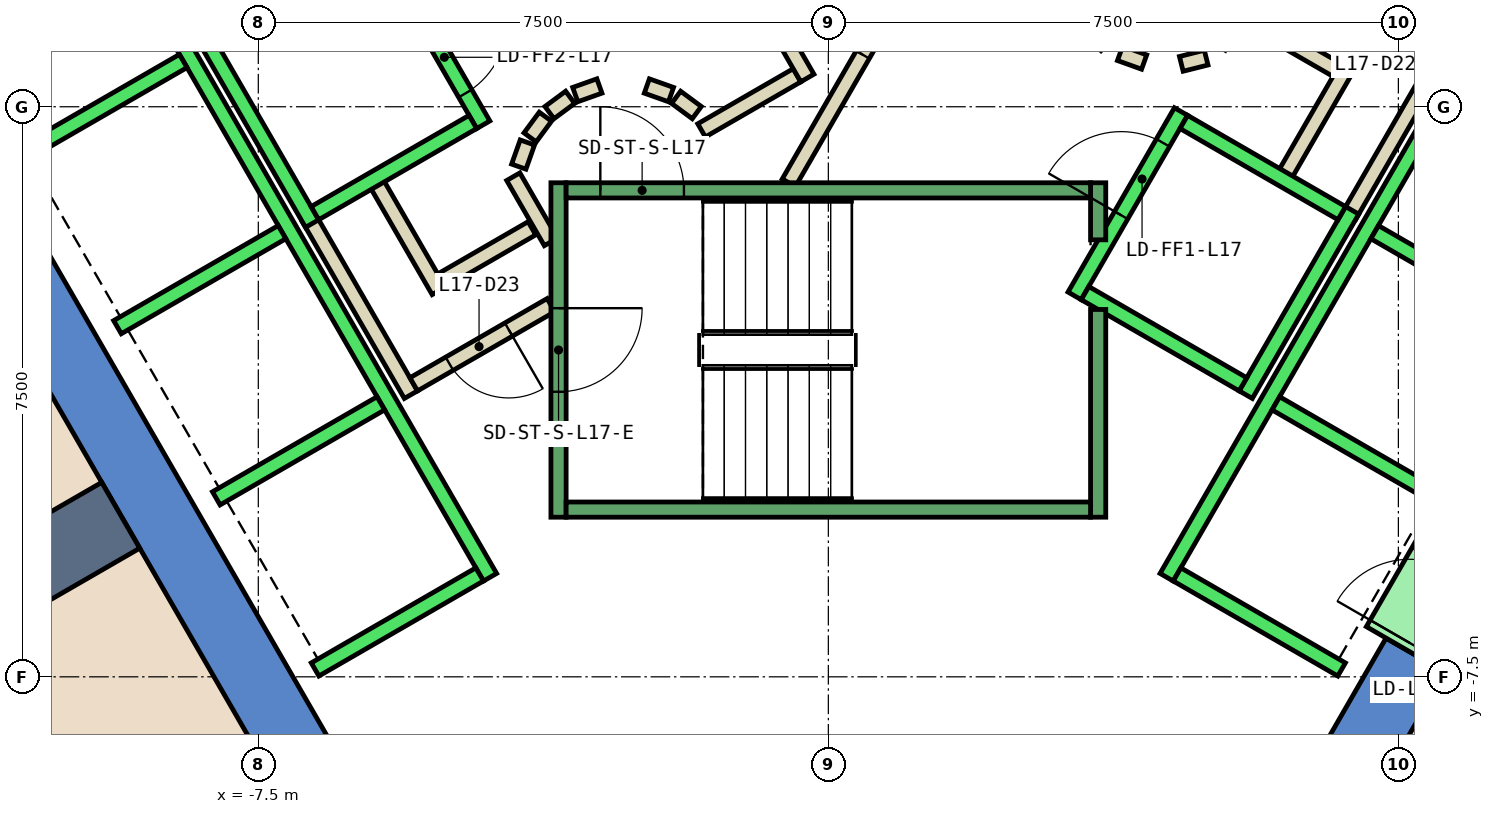
"""IFC4 building model, lengths in metres.
Left out: names, types, materials, properties, quantities, classifications, styles, units other than length and angle.
Written with IfcOpenShell. Run it as: python <this file> out.ifc"""

import sys

from ifc_helpers import new_model, si_unit, direction, frame, frame_2d, origin, place, context, subcontext, project, spatial, polyline, rectangle, outline, extrude, element, fill, save


model = new_model("IFC4")
c1 = context("Model", 3, precision=1e-05, world=origin(), true_north=direction((0.0, 1.0)))
c2 = subcontext(c1, "Body", "Model", "MODEL_VIEW")
j1 = project(units=[si_unit("LENGTHUNIT", "METRE"), si_unit("PLANEANGLEUNIT", "RADIAN")], contexts=[c1])
p1 = place(None, origin())
s1 = spatial("IfcSite", under=j1, at=p1, CompositionType="ELEMENT")
p2 = place(p1, origin())
s2 = spatial("IfcBuilding", under=s1, at=p2, CompositionType="ELEMENT")
p3 = place(p2, frame((0.0, 0.0, 81.2)))
s3 = spatial("IfcBuildingStorey", under=s2, at=p3, CompositionType="ELEMENT", Elevation=81.2)
p4 = place(p3, frame((0.0, 0.0, -0.6)))
e1 = element("IfcWall", 1, at=p4, inside=s3, PredefinedType="SHEAR", context=c2, shape_type="SweptSolid", body=[
    extrude(outline(polyline([(-13.856, 2.5), (-6.928, -9.5), (-6.409, -8.6), (-12.817, 2.5), (-13.856, 2.5)])), origin(), (0.0, 0.0, 1.0), 5.4),
])
p5 = place(p3, frame((0.0, 0.0, -0.6)))
e2 = element("IfcWall", 2, at=p5, inside=s3, PredefinedType="SHEAR", context=c2, shape_type="SweptSolid", body=[
    extrude(outline(polyline([(8.117, -7.44), (7.338, -6.99), (6.409, -8.6), (6.928, -9.5), (8.117, -7.44)])), origin(), (0.0, 0.0, 1.0), 5.4),
])
p6 = place(p3, frame((0.0, 0.0, 3.6)))
e3 = element("IfcWall", 3, at=p6, inside=s3, PredefinedType="SHEAR", context=c2, shape_type="SweptSolid", body=[
    extrude(outline(polyline([(8.767, -6.314), (7.988, -5.864), (7.338, -6.99), (8.117, -7.44), (8.767, -6.314)])), origin(), (0.0, 0.0, 1.0), 1.2),
])
p7 = place(p3, frame((-9.31, -5.375, 0.0), z_axis=(0.0, 0.0, 1.0), x_axis=(-0.866022967049, -0.500004220526, 0.0)))
e4 = element("IfcWall", 4, at=p7, inside=s3, PredefinedType="SHEAR", context=c2, shape_type="SweptSolid", body=[
    extrude(rectangle(XDim=35.802, YDim=1.0, at=frame_2d((17.901, 0.0))), origin(), (0.0, 0.0, 1.0), 4.8),
])
p8 = place(p3, frame((5.499, 1.172, 0.0), z_axis=(0.0, 0.0, 1.0), x_axis=(0.866333505267, -0.499465972466, 0.0)))
e5 = element("IfcWall", 5, at=p8, inside=s3, PredefinedType="PARTITIONING", context=c2, shape_type="SweptSolid", body=[
    extrude(rectangle(XDim=1.374, YDim=0.2, at=frame_2d((0.687, 0.0))), origin(), (0.0, 0.0, 1.0), 4.8),
])
p9 = place(p3, frame((6.826, 0.522, 0.0), z_axis=(0.0, 0.0, 1.0), x_axis=(-0.500016722714, -0.866015748706, 0.0)))
e6 = element("IfcWall", 6, at=p9, inside=s3, PredefinedType="PARTITIONING", context=c2, shape_type="SweptSolid", body=[
    extrude(rectangle(XDim=1.7, YDim=0.2, at=frame_2d((0.85, 0.0))), origin(), (0.0, 0.0, 1.0), 4.8),
])
p10 = place(p3, frame((8.192, 0.888, 0.0), z_axis=(0.0, 0.0, 1.0), x_axis=(-0.499940625693, -0.866059680843, 0.0)))
e7 = element("IfcWall", 7, at=p10, inside=s3, PredefinedType="PARTITIONING", context=c2, shape_type="SweptSolid", body=[
    extrude(rectangle(XDim=2.68, YDim=0.2, at=frame_2d((1.34, 0.0))), origin(), (0.0, 0.0, 1.0), 4.8),
])
p11 = place(p3, frame((-3.9, -1.599, 0.0), z_axis=(0.0, 0.0, 1.0), x_axis=(-0.865969445389, -0.500096910261, 0.0)))
e8 = element("IfcWall", 8, at=p11, inside=s3, PredefinedType="PARTITIONING", context=c2, shape_type="SweptSolid", body=[
    extrude(rectangle(XDim=1.373, YDim=0.2, at=frame_2d((0.687, 0.0))), origin(), (0.0, 0.0, 1.0), 4.8),
])
p12 = place(p3, frame((-5.126, -2.422, 0.0), z_axis=(0.0, 0.0, 1.0), x_axis=(-0.500062241894, 0.865989465428, 0.0)))
e9 = element("IfcWall", 9, at=p12, inside=s3, PredefinedType="PARTITIONING", context=c2, shape_type="SweptSolid", body=[
    extrude(rectangle(XDim=1.7, YDim=0.2, at=frame_2d((0.85, 0.0))), origin(), (0.0, 0.0, 1.0), 4.8),
])
p13 = place(p3, frame((-5.492, -3.788, 0.0), z_axis=(0.0, 0.0, 1.0), x_axis=(-0.500008949224, 0.866020236886, 0.0)))
e10 = element("IfcWall", 10, at=p13, inside=s3, PredefinedType="PARTITIONING", context=c2, shape_type="SweptSolid", body=[
    extrude(rectangle(XDim=2.68, YDim=0.2, at=frame_2d((1.34, 0.0))), origin(), (0.0, 0.0, 1.0), 4.8),
])
p14 = place(p3, frame((-4.145, -0.92, 0.0), z_axis=(0.0, 0.0, 1.0), x_axis=(0.499743786207, -0.866173278362, 0.0)))
e11 = element("IfcWall", 11, at=p14, inside=s3, PredefinedType="PARTITIONING", context=c2, shape_type="SweptSolid", body=[
    extrude(rectangle(XDim=0.991, YDim=0.2, at=frame_2d((0.495, 0.0))), origin(), (0.0, 0.0, 1.0), 4.8),
])
p15 = place(p3, frame((-3.65, -2.61, 0.0), z_axis=(0.0, 0.0, 1.0), x_axis=(-0.866072462134, -0.499918483688, 0.0)))
e12 = element("IfcWall", 12, at=p15, inside=s3, PredefinedType="PARTITIONING", context=c2, shape_type="SweptSolid", body=[
    extrude(rectangle(XDim=2.084, YDim=0.2, at=frame_2d((1.042, 0.0))), origin(), (0.0, 0.0, 1.0), 4.8),
])
p16 = place(p15, frame((0.642, 0.0, 0.0)))
e13 = element("IfcOpeningElement", 13, at=p16, cuts=e12, PredefinedType="OPENING", context=c2, shape_type="SweptSolid", body=[
    extrude(rectangle(XDim=0.9, YDim=2.1, at=frame_2d((0.45, 1.05))), frame((0.0, 0.11, 0.0), z_axis=(0.0, -1.0, 0.0), x_axis=(1.0, 0.0, 0.0)), (0.0, 0.0, 1.0), 0.22),
])
p17 = place(p3, frame((3.838, 0.702, 0.0), z_axis=(0.0, 0.0, 1.0), x_axis=(0.941035081519, -0.338308993895, 0.0)))
e14 = element("IfcWall", 14, at=p17, inside=s3, PredefinedType="PARTITIONING", context=c2, shape_type="SweptSolid", body=[
    extrude(rectangle(XDim=0.337, YDim=0.2, at=frame_2d((0.168, 0.0))), origin(), (0.0, 0.0, 1.0), 4.8),
])
p18 = place(p3, frame((4.644, 0.564, 0.0), z_axis=(0.0, 0.0, 1.0), x_axis=(0.969929076366, 0.243387729394, 0.0)))
e15 = element("IfcWall", 15, at=p18, inside=s3, PredefinedType="PARTITIONING", context=c2, shape_type="SweptSolid", body=[
    extrude(rectangle(XDim=0.337, YDim=0.2, at=frame_2d((0.168, 0.0))), origin(), (0.0, 0.0, 1.0), 4.8),
])
p19 = place(p3, frame((-0.52, -1.0, 0.0), z_axis=(0.0, 0.0, 1.0), x_axis=(0.50011622646, 0.865958290007, 0.0)))
e16 = element("IfcWall", 16, at=p19, inside=s3, PredefinedType="PARTITIONING", context=c2, shape_type="SweptSolid", body=[
    extrude(rectangle(XDim=4.991, YDim=0.2, at=frame_2d((2.496, 0.0))), origin(), (0.0, 0.0, 1.0), 4.8),
])
p20 = place(p19, frame((1.945, 0.0, 0.0)))
e17 = element("IfcOpeningElement", 17, at=p20, cuts=e16, PredefinedType="OPENING", context=c2, shape_type="SweptSolid", body=[
    extrude(rectangle(XDim=1.0, YDim=2.1, at=frame_2d((0.5, 1.05))), frame((0.0, 0.11, 0.0), z_axis=(0.0, -1.0, 0.0), x_axis=(1.0, 0.0, 0.0)), (0.0, 0.0, 1.0), 0.22),
])
p21 = place(p3, frame((-0.412, 0.414, 0.0), z_axis=(0.0, 0.0, 1.0), x_axis=(-0.866017369001, -0.500013916395, 0.0)))
e18 = element("IfcWall", 18, at=p21, inside=s3, PredefinedType="PARTITIONING", context=c2, shape_type="SweptSolid", body=[
    extrude(rectangle(XDim=1.45, YDim=0.2, at=frame_2d((0.725, 0.0))), origin(), (0.0, 0.0, 1.0), 4.8),
])
p22 = place(p3, frame((-1.731, -0.077, 0.0), z_axis=(0.0, 0.0, 1.0), x_axis=(-0.804311165252, 0.594208338422, 0.0)))
e19 = element("IfcWall", 19, at=p22, inside=s3, PredefinedType="PARTITIONING", context=c2, shape_type="SweptSolid", body=[
    extrude(rectangle(XDim=0.338, YDim=0.2, at=frame_2d((0.169, 0.0))), origin(), (0.0, 0.0, 1.0), 4.8),
])
p23 = place(p3, frame((-2.07, 0.16, 0.0), z_axis=(0.0, 0.0, 1.0), x_axis=(-0.942199461132, 0.335052496547, 0.0)))
e20 = element("IfcWall", 20, at=p23, inside=s3, PredefinedType="PARTITIONING", context=c2, shape_type="SweptSolid", body=[
    extrude(rectangle(XDim=0.337, YDim=0.2, at=frame_2d((0.169, 0.0))), origin(), (0.0, 0.0, 1.0), 4.8),
])
p24 = place(p3, frame((-3.012, 0.273, 0.0), z_axis=(0.0, 0.0, 1.0), x_axis=(-0.942280615813, -0.334824194261, 0.0)))
e21 = element("IfcWall", 21, at=p24, inside=s3, PredefinedType="PARTITIONING", context=c2, shape_type="SweptSolid", body=[
    extrude(rectangle(XDim=0.338, YDim=0.2, at=frame_2d((0.169, 0.0))), origin(), (0.0, 0.0, 1.0), 4.8),
])
p25 = place(p3, frame((-3.397, 0.124, 0.0), z_axis=(0.0, 0.0, 1.0), x_axis=(-0.804311165252, -0.594208338422, 0.0)))
e22 = element("IfcWall", 22, at=p25, inside=s3, PredefinedType="PARTITIONING", context=c2, shape_type="SweptSolid", body=[
    extrude(rectangle(XDim=0.338, YDim=0.2, at=frame_2d((0.169, 0.0))), origin(), (0.0, 0.0, 1.0), 4.8),
])
p26 = place(p3, frame((-3.723, -0.131, 0.0), z_axis=(0.0, 0.0, 1.0), x_axis=(-0.594675113454, -0.803966112121, 0.0)))
e23 = element("IfcWall", 23, at=p26, inside=s3, PredefinedType="PARTITIONING", context=c2, shape_type="SweptSolid", body=[
    extrude(rectangle(XDim=0.338, YDim=0.2, at=frame_2d((0.169, 0.0))), origin(), (0.0, 0.0, 1.0), 4.8),
])
p27 = place(p3, frame((-3.96, -0.47, 0.0), z_axis=(0.0, 0.0, 1.0), x_axis=(-0.334824194261, -0.942280615813, 0.0)))
e24 = element("IfcWall", 24, at=p27, inside=s3, PredefinedType="PARTITIONING", context=c2, shape_type="SweptSolid", body=[
    extrude(rectangle(XDim=0.338, YDim=0.2, at=frame_2d((0.169, 0.0))), origin(), (0.0, 0.0, 1.0), 4.8),
])
p28 = place(p3, frame((-2.771, 4.7, 0.0), z_axis=(0.0, 0.0, 1.0), x_axis=(0.499969479948, -0.866043023828, 0.0)))
e25 = element("IfcWall", 25, at=p28, inside=s3, PredefinedType="PARTITIONING", context=c2, shape_type="SweptSolid", body=[
    extrude(rectangle(XDim=4.99, YDim=0.2, at=frame_2d((2.495, 0.0))), origin(), (0.0, 0.0, 1.0), 4.8),
])
p29 = place(p28, frame((1.945, 0.0, 0.0)))
e26 = element("IfcOpeningElement", 26, at=p29, cuts=e25, PredefinedType="OPENING", context=c2, shape_type="SweptSolid", body=[
    extrude(rectangle(XDim=1.0, YDim=2.1, at=frame_2d((0.5, 1.05))), frame((0.0, 0.11, 0.0), z_axis=(0.0, -1.0, 0.0), x_axis=(1.0, 0.0, 0.0)), (0.0, 0.0, 1.0), 0.22),
])
p30 = place(p3, frame((-8.264, -11.987, 0.0), z_axis=(0.0, 0.0, 1.0), x_axis=(-0.499907863044, 0.866078592546, 0.0)))
e27 = element("IfcWall", 27, at=p30, inside=s3, PredefinedType="PARTITIONING", context=c2, shape_type="SweptSolid", body=[
    extrude(rectangle(XDim=5.699, YDim=0.2, at=frame_2d((2.85, 0.0))), origin(), (0.0, 0.0, 1.0), 4.8),
])
p31 = place(p30, frame((1.419, 0.0, 0.0)))
e28 = element("IfcOpeningElement", 28, at=p31, cuts=e27, PredefinedType="OPENING", context=c2, shape_type="SweptSolid", body=[
    extrude(rectangle(XDim=1.0, YDim=2.1, at=frame_2d((0.5, 1.05))), frame((0.0, 0.11, 0.0), z_axis=(0.0, -1.0, 0.0), x_axis=(1.0, 0.0, 0.0)), (0.0, 0.0, 1.0), 0.22),
])
p32 = place(p3, frame((-5.94, 2.188, 0.0), z_axis=(0.0, 0.0, 1.0), x_axis=(0.49994636267, -0.866056369097, 0.0)))
e29 = element("IfcWall", 29, at=p32, inside=s3, PredefinedType="STANDARD", context=c2, shape_type="SweptSolid", body=[
    extrude(rectangle(XDim=2.8, YDim=0.2, at=frame_2d((1.4, 0.0))), origin(), (0.0, 0.0, 1.0), 4.8),
])
p33 = place(p32, frame((1.225, 0.0, 0.0)))
e30 = element("IfcOpeningElement", 30, at=p33, cuts=e29, PredefinedType="OPENING", context=c2, shape_type="SweptSolid", body=[
    extrude(rectangle(XDim=1.1, YDim=2.1, at=frame_2d((0.55, 1.05))), frame((0.0, 0.11, 0.0), z_axis=(0.0, -1.0, 0.0), x_axis=(1.0, 0.0, 0.0)), (0.0, 0.0, 1.0), 0.22),
])
p34 = place(p3, frame((-8.192, 0.888, 0.0), z_axis=(0.0, 0.0, 1.0), x_axis=(0.49994636267, -0.866056369097, 0.0)))
e31 = element("IfcWall", 31, at=p34, inside=s3, PredefinedType="STANDARD", context=c2, shape_type="SweptSolid", body=[
    extrude(rectangle(XDim=2.8, YDim=0.2, at=frame_2d((1.4, 0.0))), origin(), (0.0, 0.0, 1.0), 4.8),
])
p35 = place(p3, frame((-4.677, -0.2, 0.0), z_axis=(0.0, 0.0, 1.0), x_axis=(-0.865973769406, -0.500089422704, 0.0)))
e32 = element("IfcWall", 32, at=p35, inside=s3, PredefinedType="STANDARD", context=c2, shape_type="SweptSolid", body=[
    extrude(rectangle(XDim=2.399, YDim=0.2, at=frame_2d((1.2, 0.0))), origin(), (0.0, 0.0, 1.0), 4.8),
])
p36 = place(p3, frame((-9.751, 2.99, 0.0), z_axis=(0.0, 0.0, 1.0), x_axis=(0.50000090737, -0.866024879913, 0.0)))
e33 = element("IfcWall", 33, at=p36, inside=s3, PredefinedType="STANDARD", context=c2, shape_type="SweptSolid", body=[
    extrude(rectangle(XDim=10.6, YDim=0.2, at=frame_2d((5.3, 0.0))), origin(), (0.0, 0.0, 1.0), 4.8),
])
for number, where, z_axis, x_axis in (
    (34, (-8.488, 0.602, 0.0), (0.0, 0.0, 1.0), (-0.866, -0.5, 0.0)),
    (35, (-7.188, -1.65, 0.0), (0.0, 0.0, 1.0), (-0.866, -0.5, 0.0)),
    (36, (-5.888, -3.902, 0.0), (0.0, 0.0, 1.0), (-0.866, -0.5, 0.0)),
    (37, (-4.588, -6.153, 0.0), (0.0, 0.0, 1.0), (-0.866, -0.5, 0.0)),
):
    element("IfcWall", number, at=place(p3, frame(where, z_axis=z_axis, x_axis=x_axis)), inside=s3, PredefinedType="STANDARD", context=c2, shape_type="SweptSolid", body=[
        extrude(rectangle(XDim=2.5, YDim=0.2, at=frame_2d((1.25, 0.0))), origin(), (0.0, 0.0, 1.0), 4.8),
    ])
p37 = place(p3, frame((3.24, -2.488, 0.0), z_axis=(0.0, 0.0, 1.0), x_axis=(0.49994636267, 0.866056369097, 0.0)))
e38 = element("IfcWall", 38, at=p37, inside=s3, PredefinedType="STANDARD", context=c2, shape_type="SweptSolid", body=[
    extrude(rectangle(XDim=2.8, YDim=0.2, at=frame_2d((1.4, 0.0))), origin(), (0.0, 0.0, 1.0), 4.8),
])
p38 = place(p37, frame((1.225, 0.0, 0.0)))
e39 = element("IfcOpeningElement", 39, at=p38, cuts=e38, PredefinedType="OPENING", context=c2, shape_type="SweptSolid", body=[
    extrude(rectangle(XDim=1.1, YDim=2.1, at=frame_2d((0.55, 1.05))), frame((0.0, 0.11, 0.0), z_axis=(0.0, -1.0, 0.0), x_axis=(1.0, 0.0, 0.0)), (0.0, 0.0, 1.0), 0.22),
])
p39 = place(p3, frame((5.492, -3.788, 0.0), z_axis=(0.0, 0.0, 1.0), x_axis=(0.500011755427, 0.866018616679, 0.0)))
e40 = element("IfcWall", 40, at=p39, inside=s3, PredefinedType="STANDARD", context=c2, shape_type="SweptSolid", body=[
    extrude(rectangle(XDim=2.8, YDim=0.2, at=frame_2d((1.4, 0.0))), origin(), (0.0, 0.0, 1.0), 4.8),
])
p40 = place(p3, frame((3.377, -2.452, 0.0), z_axis=(0.0, 0.0, 1.0), x_axis=(0.865955154139, -0.50012165622, 0.0)))
e41 = element("IfcWall", 41, at=p40, inside=s3, PredefinedType="STANDARD", context=c2, shape_type="SweptSolid", body=[
    extrude(rectangle(XDim=2.4, YDim=0.2, at=frame_2d((1.2, 0.0))), origin(), (0.0, 0.0, 1.0), 4.8),
])
p41 = place(p3, frame((4.677, -0.2, 0.0), z_axis=(0.0, 0.0, 1.0), x_axis=(0.865973769406, -0.500089422704, 0.0)))
e42 = element("IfcWall", 42, at=p41, inside=s3, PredefinedType="STANDARD", context=c2, shape_type="SweptSolid", body=[
    extrude(rectangle(XDim=2.399, YDim=0.2, at=frame_2d((1.2, 0.0))), origin(), (0.0, 0.0, 1.0), 4.8),
])
p42 = place(p3, frame((4.451, -6.19, 0.0), z_axis=(0.0, 0.0, 1.0), x_axis=(0.50000090737, 0.866024879913, 0.0)))
e43 = element("IfcWall", 43, at=p42, inside=s3, PredefinedType="STANDARD", context=c2, shape_type="SweptSolid", body=[
    extrude(rectangle(XDim=10.6, YDim=0.2, at=frame_2d((5.3, 0.0))), origin(), (0.0, 0.0, 1.0), 4.8),
])
for number, where, z_axis, x_axis in (
    (44, (4.588, -6.153, 0.0), (0.0, 0.0, 1.0), (0.866, -0.5, 0.0)),
    (45, (5.888, -3.902, 0.0), (0.0, 0.0, 1.0), (0.866, -0.5, 0.0)),
    (46, (7.188, -1.65, 0.0), (0.0, 0.0, 1.0), (0.866, -0.5, 0.0)),
):
    element("IfcWall", number, at=place(p3, frame(where, z_axis=z_axis, x_axis=x_axis)), inside=s3, PredefinedType="STANDARD", context=c2, shape_type="SweptSolid", body=[
        extrude(rectangle(XDim=2.5, YDim=0.2, at=frame_2d((1.25, 0.0))), origin(), (0.0, 0.0, 1.0), 4.8),
    ])
p43 = place(p3, frame((7.598, -7.14, 0.0), z_axis=(0.0, 0.0, 1.0), x_axis=(0.500362116554, 0.865816234728, 0.0)))
e47 = element("IfcWall", 47, at=p43, inside=s3, PredefinedType="STANDARD", context=c2, shape_type="SweptSolid", body=[
    extrude(rectangle(XDim=1.299, YDim=1.2, at=frame_2d((0.65, 0.0))), origin(), (0.0, 0.0, 1.0), 2.4),
])
p44 = place(p43, frame((0.1, 0.0, 0.0)))
e48 = element("IfcOpeningElement", 48, at=p44, cuts=e47, PredefinedType="OPENING", context=c2, shape_type="SweptSolid", body=[
    extrude(rectangle(XDim=1.1, YDim=2.3, at=frame_2d((0.55, 1.15))), frame((0.0, 0.61, 0.0), z_axis=(0.0, -1.0, 0.0), x_axis=(1.0, 0.0, 0.0)), (0.0, 0.0, 1.0), 1.22),
])
p45 = place(p3, frame((-3.55, -1.0, 0.0), z_axis=(0.0, 0.0, 1.0), x_axis=(0.0, -1.0, 0.0)))
e49 = element("IfcWall", 49, at=p45, inside=s3, PredefinedType="STANDARD", context=c2, shape_type="SweptSolid", body=[
    extrude(rectangle(XDim=4.4, YDim=0.2, at=frame_2d((2.2, 0.0))), origin(), (0.0, 0.0, 1.0), 4.8),
])
p46 = place(p45, frame((1.65, 0.0, 0.0)))
e50 = element("IfcOpeningElement", 50, at=p46, cuts=e49, PredefinedType="OPENING", context=c2, shape_type="SweptSolid", body=[
    extrude(rectangle(XDim=1.1, YDim=2.2, at=frame_2d((0.55, 1.1))), frame((0.0, 0.11, 0.0), z_axis=(0.0, -1.0, 0.0), x_axis=(1.0, 0.0, 0.0)), (0.0, 0.0, 1.0), 0.22),
])
p47 = place(p3, frame((3.55, -2.667, 0.0), z_axis=(0.0, 0.0, 1.0), x_axis=(0.0, -1.0, 0.0)))
e51 = element("IfcWall", 51, at=p47, inside=s3, PredefinedType="STANDARD", context=c2, shape_type="SweptSolid", body=[
    extrude(rectangle(XDim=2.733, YDim=0.2, at=frame_2d((1.366, 0.0))), origin(), (0.0, 0.0, 1.0), 4.8),
])
p48 = place(p3, frame((3.55, -1.0, 0.0), z_axis=(0.0, 0.0, 1.0), x_axis=(0.0, -1.0, 0.0)))
e52 = element("IfcWall", 52, at=p48, inside=s3, PredefinedType="STANDARD", context=c2, shape_type="SweptSolid", body=[
    extrude(rectangle(XDim=0.751, YDim=0.2, at=frame_2d((0.375, 0.0))), origin(), (0.0, 0.0, 1.0), 4.8),
])
p49 = place(p3, frame((-3.45, -1.1, 0.0), z_axis=(0.0, 0.0, 1.0), x_axis=(1.0, 0.0, 0.0)))
e53 = element("IfcWall", 53, at=p49, inside=s3, PredefinedType="STANDARD", context=c2, shape_type="SweptSolid", body=[
    extrude(rectangle(XDim=6.9, YDim=0.2, at=frame_2d((3.45, 0.0))), origin(), (0.0, 0.0, 1.0), 4.8),
])
p50 = place(p49, frame((0.45, 0.0, 0.0)))
e54 = element("IfcOpeningElement", 54, at=p50, cuts=e53, PredefinedType="OPENING", context=c2, shape_type="SweptSolid", body=[
    extrude(rectangle(XDim=1.1, YDim=2.2, at=frame_2d((0.55, 1.1))), frame((0.0, 0.11, 0.0), z_axis=(0.0, -1.0, 0.0), x_axis=(1.0, 0.0, 0.0)), (0.0, 0.0, 1.0), 0.22),
])
p51 = place(p3, frame((-3.45, -5.3, 0.0), z_axis=(0.0, 0.0, 1.0), x_axis=(1.0, 0.0, 0.0)))
e55 = element("IfcWall", 55, at=p51, inside=s3, PredefinedType="STANDARD", context=c2, shape_type="SweptSolid", body=[
    extrude(rectangle(XDim=6.9, YDim=0.2, at=frame_2d((3.45, 0.0))), origin(), (0.0, 0.0, 1.0), 4.8),
])
p52 = place(p20, origin())
e56 = element("IfcDoor", 56, at=p52, inside=s3, OperationType="SINGLE_SWING_LEFT", PredefinedType="DOOR", context=c2, shape_type="SweptSolid", body=[
    extrude(rectangle(XDim=1.0, YDim=2.1, at=frame_2d((0.5, 1.05))), frame((0.0, 0.025, 0.0), z_axis=(0.0, -1.0, 0.0), x_axis=(1.0, 0.0, 0.0)), (0.0, 0.0, 1.0), 0.05),
])
fill(e17, e56)
p53 = place(p16, origin())
e57 = element("IfcDoor", 57, at=p53, inside=s3, OperationType="SINGLE_SWING_LEFT", PredefinedType="DOOR", context=c2, shape_type="SweptSolid", body=[
    extrude(rectangle(XDim=0.9, YDim=2.1, at=frame_2d((0.45, 1.05))), frame((0.0, 0.025, 0.0), z_axis=(0.0, -1.0, 0.0), x_axis=(1.0, 0.0, 0.0)), (0.0, 0.0, 1.0), 0.05),
])
fill(e13, e57)
p54 = place(p44, origin())
e58 = element("IfcDoor", 58, at=p54, inside=s3, OperationType="SLIDING_TO_LEFT", PredefinedType="DOOR", context=c2, shape_type="SweptSolid", body=[
    extrude(rectangle(XDim=1.1, YDim=2.3, at=frame_2d((0.55, 1.15))), frame((0.0, 0.025, 0.0), z_axis=(0.0, -1.0, 0.0), x_axis=(1.0, 0.0, 0.0)), (0.0, 0.0, 1.0), 0.05),
])
fill(e48, e58)
p55 = place(p38, origin())
e59 = element("IfcDoor", 59, at=p55, inside=s3, OperationType="SLIDING_TO_LEFT", PredefinedType="DOOR", context=c2, shape_type="SweptSolid", body=[
    extrude(rectangle(XDim=1.1, YDim=2.1, at=frame_2d((0.55, 1.05))), frame((0.0, 0.025, 0.0), z_axis=(0.0, -1.0, 0.0), x_axis=(1.0, 0.0, 0.0)), (0.0, 0.0, 1.0), 0.05),
])
fill(e39, e59)
p56 = place(p33, origin())
e60 = element("IfcDoor", 60, at=p56, inside=s3, OperationType="SLIDING_TO_LEFT", PredefinedType="DOOR", context=c2, shape_type="SweptSolid", body=[
    extrude(rectangle(XDim=1.1, YDim=2.1, at=frame_2d((0.55, 1.05))), frame((0.0, 0.025, 0.0), z_axis=(0.0, -1.0, 0.0), x_axis=(1.0, 0.0, 0.0)), (0.0, 0.0, 1.0), 0.05),
])
fill(e30, e60)
p57 = place(p50, origin())
e61 = element("IfcDoor", 61, at=p57, inside=s3, OperationType="SINGLE_SWING_LEFT", PredefinedType="DOOR", context=c2, shape_type="SweptSolid", body=[
    extrude(rectangle(XDim=1.1, YDim=2.2, at=frame_2d((0.55, 1.1))), frame((0.0, 0.025, 0.0), z_axis=(0.0, -1.0, 0.0), x_axis=(1.0, 0.0, 0.0)), (0.0, 0.0, 1.0), 0.05),
])
fill(e54, e61)
p58 = place(p46, origin())
e62 = element("IfcDoor", 62, at=p58, inside=s3, OperationType="SINGLE_SWING_LEFT", PredefinedType="DOOR", context=c2, shape_type="SweptSolid", body=[
    extrude(rectangle(XDim=1.1, YDim=2.2, at=frame_2d((0.55, 1.1))), frame((0.0, 0.025, 0.0), z_axis=(0.0, -1.0, 0.0), x_axis=(1.0, 0.0, 0.0)), (0.0, 0.0, 1.0), 0.05),
])
fill(e50, e62)
save(model, sys.argv[1])
